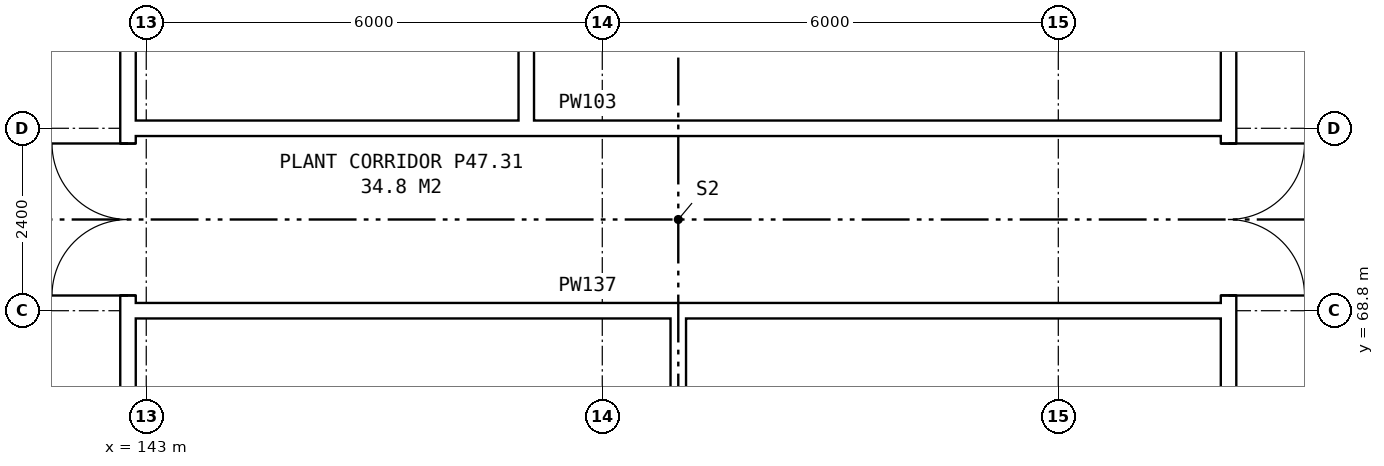
"""IFC4 building model, lengths in metres.
Left out: names, types, materials, properties, quantities, classifications, styles, units other than length and angle.
Written with IfcOpenShell. Run it as: python <this file> out.ifc"""

import sys

from ifc_helpers import new_model, si_unit, direction, frame, frame_2d, origin, place, context, subcontext, project, spatial, rectangle, extrude, element, fill, save


model = new_model("IFC4")
c1 = context("Model", 3, precision=1e-05, world=origin(), true_north=direction((0.0, 1.0)))
c2 = subcontext(c1, "Body", "Model", "MODEL_VIEW")
j1 = project(units=[si_unit("LENGTHUNIT", "METRE"), si_unit("PLANEANGLEUNIT", "RADIAN")], contexts=[c1])
p1 = place(None, origin())
s1 = spatial("IfcSite", under=j1, at=p1, CompositionType="ELEMENT")
p2 = place(p1, origin())
s2 = spatial("IfcBuilding", under=s1, at=p2, CompositionType="ELEMENT")
p3 = place(p2, frame((0.0, 0.0, 167.1)))
s3 = spatial("IfcBuildingStorey", under=s2, at=p3, CompositionType="ELEMENT", Elevation=167.1)
p4 = place(p3, frame((142.76, 63.9, 0.0), z_axis=(0.0, 0.0, 1.0), x_axis=(0.0, 1.0, 0.0)))
e1 = element("IfcWall", 1, at=p4, inside=s3, PredefinedType="PARTITIONING", context=c2, shape_type="SweptSolid", body=[
    extrude(rectangle(XDim=12.2, YDim=0.2, at=frame_2d((6.1, 0.0))), origin(), (0.0, 0.0, 1.0), 4.2),
])
p5 = place(p4, frame((5.1, 0.0, 0.0)))
e2 = element("IfcOpeningElement", 2, at=p5, cuts=e1, PredefinedType="OPENING", context=c2, shape_type="SweptSolid", body=[
    extrude(rectangle(XDim=2.0, YDim=2.1, at=frame_2d((1.0, 1.05))), frame((0.0, 0.11, 0.0), z_axis=(0.0, -1.0, 0.0), x_axis=(1.0, 0.0, 0.0)), (0.0, 0.0, 1.0), 0.22),
])
p6 = place(p3, frame((157.24, 63.9, 0.0), z_axis=(0.0, 0.0, 1.0), x_axis=(0.0, 1.0, 0.0)))
e3 = element("IfcWall", 3, at=p6, inside=s3, PredefinedType="PARTITIONING", context=c2, shape_type="SweptSolid", body=[
    extrude(rectangle(XDim=12.2, YDim=0.2, at=frame_2d((6.1, 0.0))), origin(), (0.0, 0.0, 1.0), 4.2),
])
p7 = place(p6, frame((5.1, 0.0, 0.0)))
e4 = element("IfcOpeningElement", 4, at=p7, cuts=e3, PredefinedType="OPENING", context=c2, shape_type="SweptSolid", body=[
    extrude(rectangle(XDim=2.0, YDim=2.1, at=frame_2d((1.0, 1.05))), frame((0.0, 0.11, 0.0), z_axis=(0.0, -1.0, 0.0), x_axis=(1.0, 0.0, 0.0)), (0.0, 0.0, 1.0), 0.22),
])
for number, where, z_axis, x_axis in (
    (5, (142.76, 68.8, 0.0), (0.0, 0.0, 1.0), (1.0, 0.0, 0.0)),
    (6, (142.76, 71.2, 0.0), (0.0, 0.0, 1.0), (1.0, 0.0, 0.0)),
):
    element("IfcWall", number, at=place(p3, frame(where, z_axis=z_axis, x_axis=x_axis)), inside=s3, PredefinedType="PARTITIONING", context=c2, shape_type="SweptSolid", body=[
        extrude(rectangle(XDim=14.48, YDim=0.2, at=frame_2d((7.24, 0.0))), origin(), (0.0, 0.0, 1.0), 4.2),
    ])
for number, where, z_axis, x_axis in (
    (7, (148.0, 71.1, 0.0), (0.0, 0.0, 1.0), (0.0, 1.0, 0.0)),
    (8, (150.0, 63.7, 0.0), (0.0, 0.0, 1.0), (0.0, 1.0, 0.0)),
):
    element("IfcWall", number, at=place(p3, frame(where, z_axis=z_axis, x_axis=x_axis)), inside=s3, PredefinedType="PARTITIONING", context=c2, shape_type="SweptSolid", body=[
        extrude(rectangle(XDim=5.2, YDim=0.2, at=frame_2d((2.6, 0.0))), origin(), (0.0, 0.0, 1.0), 4.2),
    ])
p8 = place(p5, origin())
e9 = element("IfcDoor", 9, at=p8, inside=s3, OperationType="DOUBLE_DOOR_SINGLE_SWING", PredefinedType="DOOR", context=c2, shape_type="SweptSolid", body=[
    extrude(rectangle(XDim=2.0, YDim=2.1, at=frame_2d((1.0, 1.05))), frame((0.0, 0.025, 0.0), z_axis=(0.0, -1.0, 0.0), x_axis=(1.0, 0.0, 0.0)), (0.0, 0.0, 1.0), 0.05),
])
fill(e2, e9)
p9 = place(p7, frame((2.0, 0.0, 0.0), z_axis=(0.0, 0.0, 1.0), x_axis=(-1.0, 0.0, 0.0)))
e10 = element("IfcDoor", 10, at=p9, inside=s3, OperationType="DOUBLE_DOOR_SINGLE_SWING", PredefinedType="DOOR", context=c2, shape_type="SweptSolid", body=[
    extrude(rectangle(XDim=2.0, YDim=2.1, at=frame_2d((1.0, 1.05))), frame((0.0, 0.025, 0.0), z_axis=(0.0, -1.0, 0.0), x_axis=(1.0, 0.0, 0.0)), (0.0, 0.0, 1.0), 0.05),
])
fill(e4, e10)
save(model, sys.argv[1])
